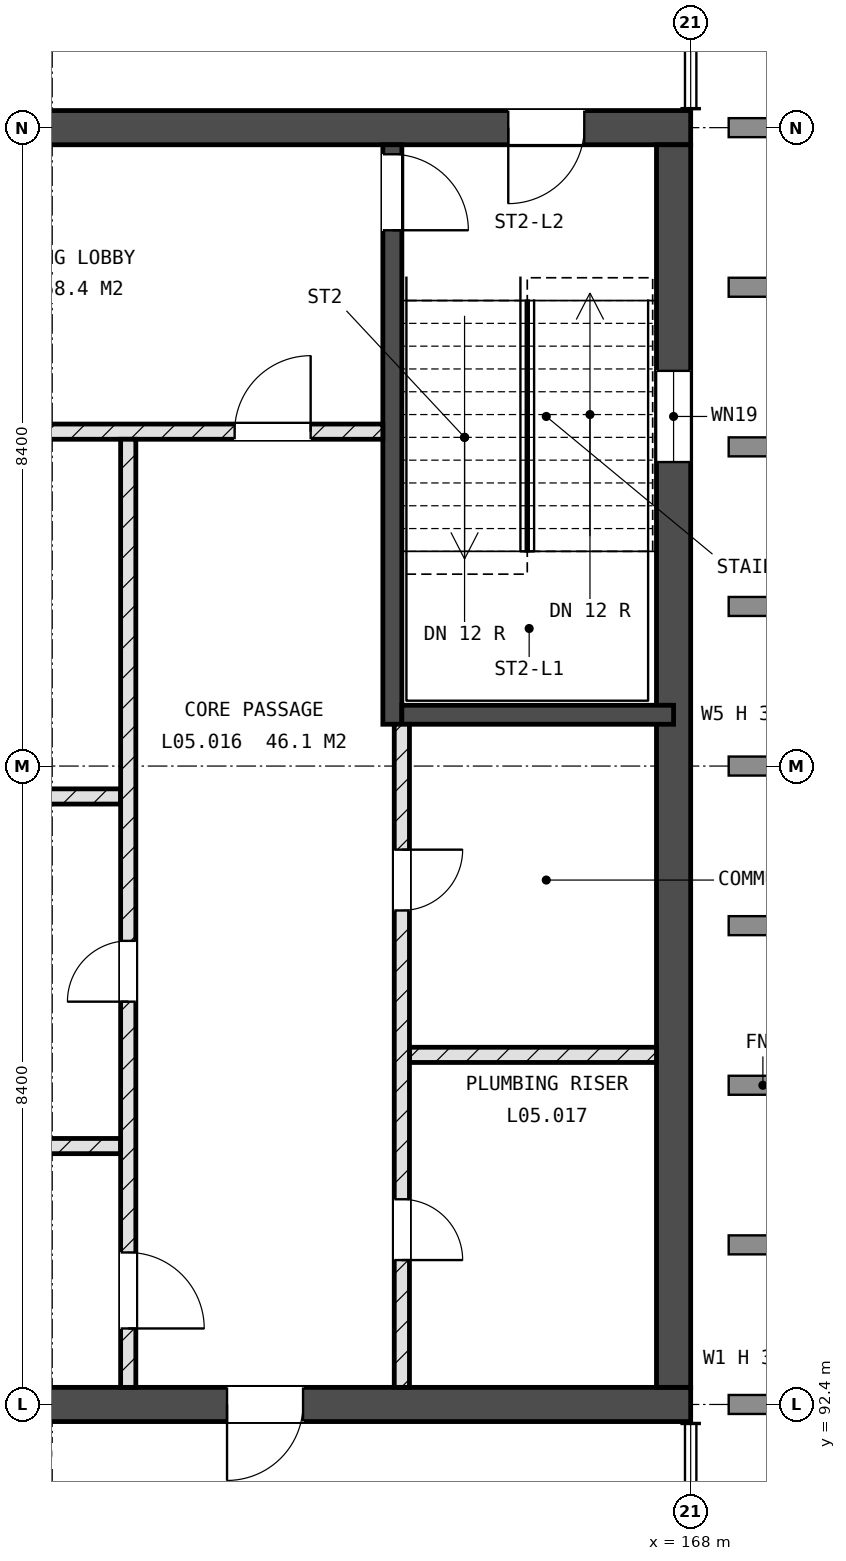
"""IFC4 building model, lengths in metres.
Left out: names, types, materials, properties, quantities, classifications, styles, units other than length and angle.
Written with IfcOpenShell. Run it as: python <this file> out.ifc"""

import sys

from ifc_helpers import new_model, si_unit, direction, frame, frame_2d, origin, place, context, subcontext, project, spatial, rectangle, extrude, element, fill, save


model = new_model("IFC4")
c1 = context("Model", 3, precision=1e-05, world=origin(), true_north=direction((0.0, 1.0)))
c2 = subcontext(c1, "Body", "Model", "MODEL_VIEW")
j1 = project(units=[si_unit("LENGTHUNIT", "METRE"), si_unit("PLANEANGLEUNIT", "RADIAN")], contexts=[c1])
p1 = place(None, origin())
s1 = spatial("IfcSite", under=j1, at=p1, CompositionType="ELEMENT")
p2 = place(p1, origin())
s2 = spatial("IfcBuilding", under=s1, at=p2, CompositionType="ELEMENT")
p3 = place(p2, frame((0.0, 0.0, 21.6)))
s3 = spatial("IfcBuildingStorey", under=s2, at=p3, CompositionType="ELEMENT", Elevation=21.6)
p4 = place(p3, frame((142.8, 92.4, -0.25), z_axis=(0.0, 0.0, 1.0), x_axis=(1.0, 0.0, 0.0)))
e1 = element("IfcWall", 1, at=p4, inside=s3, PredefinedType="SHEAR", context=c2, shape_type="SweptSolid", body=[
    extrude(rectangle(XDim=25.2, YDim=0.45, at=frame_2d((12.6, 0.0))), origin(), (0.0, 0.0, 1.0), 3.6),
])
p5 = place(p4, frame((1.4, 0.0, 0.25)))
e2 = element("IfcOpeningElement", 2, at=p5, cuts=e1, PredefinedType="OPENING", context=c2, shape_type="SweptSolid", body=[
    extrude(rectangle(XDim=1.0, YDim=2.1, at=frame_2d((0.5, 1.05))), frame((0.0, 0.235, 0.0), z_axis=(0.0, -1.0, 0.0), x_axis=(1.0, 0.0, 0.0)), (0.0, 0.0, 1.0), 0.47),
])
p6 = place(p4, frame((19.1, 0.0, 0.25)))
e3 = element("IfcOpeningElement", 3, at=p6, cuts=e1, PredefinedType="OPENING", context=c2, shape_type="SweptSolid", body=[
    extrude(rectangle(XDim=1.0, YDim=2.1, at=frame_2d((0.5, 1.05))), frame((0.0, 0.235, 0.0), z_axis=(0.0, -1.0, 0.0), x_axis=(1.0, 0.0, 0.0)), (0.0, 0.0, 1.0), 0.47),
])
p7 = place(p4, frame((10.4, 0.0, 0.25)))
e4 = element("IfcOpeningElement", 4, at=p7, cuts=e1, PredefinedType="OPENING", context=c2, shape_type="SweptSolid", body=[
    extrude(rectangle(XDim=1.0, YDim=2.1, at=frame_2d((0.5, 1.05))), frame((0.0, 0.235, 0.0), z_axis=(0.0, -1.0, 0.0), x_axis=(1.0, 0.0, 0.0)), (0.0, 0.0, 1.0), 0.47),
])
p8 = place(p3, frame((142.8, 109.2, -0.25), z_axis=(0.0, 0.0, 1.0), x_axis=(1.0, 0.0, 0.0)))
e5 = element("IfcWall", 5, at=p8, inside=s3, PredefinedType="SHEAR", context=c2, shape_type="SweptSolid", body=[
    extrude(rectangle(XDim=25.2, YDim=0.45, at=frame_2d((12.6, 0.0))), origin(), (0.0, 0.0, 1.0), 3.6),
])
p9 = place(p8, frame((22.8, 0.0, 0.25)))
e6 = element("IfcOpeningElement", 6, at=p9, cuts=e5, PredefinedType="OPENING", context=c2, shape_type="SweptSolid", body=[
    extrude(rectangle(XDim=1.0, YDim=2.1, at=frame_2d((0.5, 1.05))), frame((0.0, 0.235, 0.0), z_axis=(0.0, -1.0, 0.0), x_axis=(1.0, 0.0, 0.0)), (0.0, 0.0, 1.0), 0.47),
])
p10 = place(p8, frame((1.5, 0.0, 0.25)))
e7 = element("IfcOpeningElement", 7, at=p10, cuts=e5, PredefinedType="OPENING", context=c2, shape_type="SweptSolid", body=[
    extrude(rectangle(XDim=0.8, YDim=2.1, at=frame_2d((0.4, 1.05))), frame((0.0, 0.235, 0.0), z_axis=(0.0, -1.0, 0.0), x_axis=(1.0, 0.0, 0.0)), (0.0, 0.0, 1.0), 0.47),
])
p11 = place(p8, frame((13.4, 0.0, 0.25)))
e8 = element("IfcOpeningElement", 8, at=p11, cuts=e5, PredefinedType="OPENING", context=c2, shape_type="SweptSolid", body=[
    extrude(rectangle(XDim=1.0, YDim=2.1, at=frame_2d((0.5, 1.05))), frame((0.0, 0.235, 0.0), z_axis=(0.0, -1.0, 0.0), x_axis=(1.0, 0.0, 0.0)), (0.0, 0.0, 1.0), 0.47),
])
p12 = place(p3, frame((167.775, 92.625, -0.25), z_axis=(0.0, 0.0, 1.0), x_axis=(0.0, 1.0, 0.0)))
e9 = element("IfcWall", 9, at=p12, inside=s3, PredefinedType="SHEAR", context=c2, shape_type="SweptSolid", body=[
    extrude(rectangle(XDim=16.35, YDim=0.45, at=frame_2d((8.175, 0.0))), origin(), (0.0, 0.0, 1.0), 3.6),
])
p13 = place(p12, frame((12.175, 0.0, 1.85)))
e10 = element("IfcOpeningElement", 10, at=p13, cuts=e9, PredefinedType="OPENING", context=c2, shape_type="SweptSolid", body=[
    extrude(rectangle(XDim=1.2, YDim=0.9, at=frame_2d((0.6, 0.45))), frame((0.0, 0.235, 0.0), z_axis=(0.0, -1.0, 0.0), x_axis=(1.0, 0.0, 0.0)), (0.0, 0.0, 1.0), 0.47),
])
p14 = place(p3, frame((164.075, 101.35, -0.25), z_axis=(0.0, 0.0, 1.0), x_axis=(0.0, 1.0, 0.0)))
e11 = element("IfcWall", 11, at=p14, inside=s3, PredefinedType="SHEAR", context=c2, shape_type="SweptSolid", body=[
    extrude(rectangle(XDim=7.625, YDim=0.25, at=frame_2d((3.812, 0.0))), origin(), (0.0, 0.0, 1.0), 3.6),
])
p15 = place(p14, frame((6.5, 0.0, 0.25)))
e12 = element("IfcOpeningElement", 12, at=p15, cuts=e11, PredefinedType="OPENING", context=c2, shape_type="SweptSolid", body=[
    extrude(rectangle(XDim=1.0, YDim=2.1, at=frame_2d((0.5, 1.05))), frame((0.0, 0.135, 0.0), z_axis=(0.0, -1.0, 0.0), x_axis=(1.0, 0.0, 0.0)), (0.0, 0.0, 1.0), 0.27),
])
p16 = place(p3, frame((164.2, 101.475, -0.25), z_axis=(0.0, 0.0, 1.0), x_axis=(1.0, 0.0, 0.0)))
e13 = element("IfcWall", 13, at=p16, inside=s3, PredefinedType="SHEAR", context=c2, shape_type="SweptSolid", body=[
    extrude(rectangle(XDim=3.575, YDim=0.25, at=frame_2d((1.788, 0.0))), origin(), (0.0, 0.0, 1.0), 3.6),
])
p17 = place(p3, frame((158.25, 95.8, 0.0), z_axis=(0.0, 0.0, 1.0), x_axis=(1.0, 0.0, 0.0)))
e14 = element("IfcWall", 14, at=p17, inside=s3, PredefinedType="SOLIDWALL", context=c2, shape_type="SweptSolid", body=[
    extrude(rectangle(XDim=2.25, YDim=0.2, at=frame_2d((1.125, 0.0))), origin(), (0.0, 0.0, 1.0), 3.3),
])
p18 = place(p3, frame((164.3, 97.0, 0.0), z_axis=(0.0, 0.0, 1.0), x_axis=(1.0, 0.0, 0.0)))
e15 = element("IfcWall", 15, at=p18, inside=s3, PredefinedType="SOLIDWALL", context=c2, shape_type="SweptSolid", body=[
    extrude(rectangle(XDim=3.25, YDim=0.2, at=frame_2d((1.625, 0.0))), origin(), (0.0, 0.0, 1.0), 3.3),
])
p19 = place(p3, frame((146.5, 100.4, 0.0), z_axis=(0.0, 0.0, 1.0), x_axis=(1.0, 0.0, 0.0)))
e16 = element("IfcWall", 16, at=p19, inside=s3, PredefinedType="SOLIDWALL", context=c2, shape_type="SweptSolid", body=[
    extrude(rectangle(XDim=14.0, YDim=0.2, at=frame_2d((7.0, 0.0))), origin(), (0.0, 0.0, 1.0), 3.3),
])
p20 = place(p3, frame((143.25, 105.2, 0.0), z_axis=(0.0, 0.0, 1.0), x_axis=(1.0, 0.0, 0.0)))
e17 = element("IfcWall", 17, at=p20, inside=s3, PredefinedType="SOLIDWALL", context=c2, shape_type="SweptSolid", body=[
    extrude(rectangle(XDim=20.7, YDim=0.2, at=frame_2d((10.35, 0.0))), origin(), (0.0, 0.0, 1.0), 3.3),
])
p21 = place(p20, frame((11.45, 0.0, 0.0)))
e18 = element("IfcOpeningElement", 18, at=p21, cuts=e17, PredefinedType="OPENING", context=c2, shape_type="SweptSolid", body=[
    extrude(rectangle(XDim=0.8, YDim=2.1, at=frame_2d((0.4, 1.05))), frame((0.0, 0.11, 0.0), z_axis=(0.0, -1.0, 0.0), x_axis=(1.0, 0.0, 0.0)), (0.0, 0.0, 1.0), 0.22),
])
p22 = place(p20, frame((18.75, 0.0, 0.0)))
e19 = element("IfcOpeningElement", 19, at=p22, cuts=e17, PredefinedType="OPENING", context=c2, shape_type="SweptSolid", body=[
    extrude(rectangle(XDim=1.0, YDim=2.1, at=frame_2d((0.5, 1.05))), frame((0.0, 0.11, 0.0), z_axis=(0.0, -1.0, 0.0), x_axis=(1.0, 0.0, 0.0)), (0.0, 0.0, 1.0), 0.22),
])
p23 = place(p3, frame((160.6, 92.625, 0.0), z_axis=(0.0, 0.0, 1.0), x_axis=(0.0, 1.0, 0.0)))
e20 = element("IfcWall", 20, at=p23, inside=s3, PredefinedType="SOLIDWALL", context=c2, shape_type="SweptSolid", body=[
    extrude(rectangle(XDim=12.475, YDim=0.2, at=frame_2d((6.238, 0.0))), origin(), (0.0, 0.0, 1.0), 3.3),
])
p24 = place(p23, frame((5.075, 0.0, 0.0)))
e21 = element("IfcOpeningElement", 21, at=p24, cuts=e20, PredefinedType="OPENING", context=c2, shape_type="SweptSolid", body=[
    extrude(rectangle(XDim=0.8, YDim=2.1, at=frame_2d((0.4, 1.05))), frame((0.0, 0.11, 0.0), z_axis=(0.0, -1.0, 0.0), x_axis=(1.0, 0.0, 0.0)), (0.0, 0.0, 1.0), 0.22),
])
p25 = place(p23, frame((0.775, 0.0, 0.0)))
e22 = element("IfcOpeningElement", 22, at=p25, cuts=e20, PredefinedType="OPENING", context=c2, shape_type="SweptSolid", body=[
    extrude(rectangle(XDim=1.0, YDim=2.1, at=frame_2d((0.5, 1.05))), frame((0.0, 0.11, 0.0), z_axis=(0.0, -1.0, 0.0), x_axis=(1.0, 0.0, 0.0)), (0.0, 0.0, 1.0), 0.22),
])
p26 = place(p3, frame((164.2, 92.625, 0.0), z_axis=(0.0, 0.0, 1.0), x_axis=(0.0, 1.0, 0.0)))
e23 = element("IfcWall", 23, at=p26, inside=s3, PredefinedType="SOLIDWALL", context=c2, shape_type="SweptSolid", body=[
    extrude(rectangle(XDim=8.725, YDim=0.2, at=frame_2d((4.363, 0.0))), origin(), (0.0, 0.0, 1.0), 3.3),
])
p27 = place(p26, frame((1.675, 0.0, 0.0)))
e24 = element("IfcOpeningElement", 24, at=p27, cuts=e23, PredefinedType="OPENING", context=c2, shape_type="SweptSolid", body=[
    extrude(rectangle(XDim=0.8, YDim=2.1, at=frame_2d((0.4, 1.05))), frame((0.0, 0.11, 0.0), z_axis=(0.0, -1.0, 0.0), x_axis=(1.0, 0.0, 0.0)), (0.0, 0.0, 1.0), 0.22),
])
p28 = place(p26, frame((6.275, 0.0, 0.0)))
e25 = element("IfcOpeningElement", 25, at=p28, cuts=e23, PredefinedType="OPENING", context=c2, shape_type="SweptSolid", body=[
    extrude(rectangle(XDim=0.8, YDim=2.1, at=frame_2d((0.4, 1.05))), frame((0.0, 0.11, 0.0), z_axis=(0.0, -1.0, 0.0), x_axis=(1.0, 0.0, 0.0)), (0.0, 0.0, 1.0), 0.22),
])
p29 = place(p13, origin())
e26 = element("IfcWindow", 26, at=p29, inside=s3, PartitioningType="SINGLE_PANEL", PredefinedType="WINDOW", context=c2, shape_type="SweptSolid", body=[
    extrude(rectangle(XDim=1.2, YDim=0.9, at=frame_2d((0.6, 0.45))), frame((0.0, 0.03, 0.0), z_axis=(0.0, -1.0, 0.0), x_axis=(1.0, 0.0, 0.0)), (0.0, 0.0, 1.0), 0.06),
])
fill(e10, e26)
p30 = place(p15, origin())
e27 = element("IfcDoor", 27, at=p30, inside=s3, OperationType="SINGLE_SWING_LEFT", PredefinedType="DOOR", context=c2, shape_type="SweptSolid", body=[
    extrude(rectangle(XDim=1.0, YDim=2.1, at=frame_2d((0.5, 1.05))), frame((0.0, 0.025, 0.0), z_axis=(0.0, -1.0, 0.0), x_axis=(1.0, 0.0, 0.0)), (0.0, 0.0, 1.0), 0.05),
])
fill(e12, e27)
p31 = place(p9, origin())
e28 = element("IfcDoor", 28, at=p31, inside=s3, OperationType="SINGLE_SWING_LEFT", PredefinedType="DOOR", context=c2, shape_type="SweptSolid", body=[
    extrude(rectangle(XDim=1.0, YDim=2.1, at=frame_2d((0.5, 1.05))), frame((0.0, 0.025, 0.0), z_axis=(0.0, -1.0, 0.0), x_axis=(1.0, 0.0, 0.0)), (0.0, 0.0, 1.0), 0.05),
])
fill(e6, e28)
p32 = place(p27, origin())
e29 = element("IfcDoor", 29, at=p32, inside=s3, OperationType="SINGLE_SWING_LEFT", PredefinedType="DOOR", context=c2, shape_type="SweptSolid", body=[
    extrude(rectangle(XDim=0.8, YDim=2.1, at=frame_2d((0.4, 1.05))), frame((0.0, 0.025, 0.0), z_axis=(0.0, -1.0, 0.0), x_axis=(1.0, 0.0, 0.0)), (0.0, 0.0, 1.0), 0.05),
])
fill(e24, e29)
p33 = place(p28, origin())
e30 = element("IfcDoor", 30, at=p33, inside=s3, OperationType="SINGLE_SWING_RIGHT", PredefinedType="DOOR", context=c2, shape_type="SweptSolid", body=[
    extrude(rectangle(XDim=0.8, YDim=2.1, at=frame_2d((0.4, 1.05))), frame((0.0, 0.025, 0.0), z_axis=(0.0, -1.0, 0.0), x_axis=(1.0, 0.0, 0.0)), (0.0, 0.0, 1.0), 0.05),
])
fill(e25, e30)
p34 = place(p24, origin())
e31 = element("IfcDoor", 31, at=p34, inside=s3, OperationType="SINGLE_SWING_RIGHT", PredefinedType="DOOR", context=c2, shape_type="SweptSolid", body=[
    extrude(rectangle(XDim=0.8, YDim=2.1, at=frame_2d((0.4, 1.05))), frame((0.0, 0.025, 0.0), z_axis=(0.0, -1.0, 0.0), x_axis=(1.0, 0.0, 0.0)), (0.0, 0.0, 1.0), 0.05),
])
fill(e21, e31)
p35 = place(p6, origin())
e32 = element("IfcDoor", 32, at=p35, inside=s3, OperationType="SINGLE_SWING_LEFT", PredefinedType="DOOR", context=c2, shape_type="SweptSolid", body=[
    extrude(rectangle(XDim=1.0, YDim=2.1, at=frame_2d((0.5, 1.05))), frame((0.0, 0.025, 0.0), z_axis=(0.0, -1.0, 0.0), x_axis=(1.0, 0.0, 0.0)), (0.0, 0.0, 1.0), 0.05),
])
fill(e3, e32)
p36 = place(p25, origin())
e33 = element("IfcDoor", 33, at=p36, inside=s3, OperationType="SINGLE_SWING_LEFT", PredefinedType="DOOR", context=c2, shape_type="SweptSolid", body=[
    extrude(rectangle(XDim=1.0, YDim=2.1, at=frame_2d((0.5, 1.05))), frame((0.0, 0.025, 0.0), z_axis=(0.0, -1.0, 0.0), x_axis=(1.0, 0.0, 0.0)), (0.0, 0.0, 1.0), 0.05),
])
fill(e22, e33)
p37 = place(p22, origin())
e34 = element("IfcDoor", 34, at=p37, inside=s3, OperationType="SINGLE_SWING_LEFT", PredefinedType="DOOR", context=c2, shape_type="SweptSolid", body=[
    extrude(rectangle(XDim=1.0, YDim=2.1, at=frame_2d((0.5, 1.05))), frame((0.0, 0.025, 0.0), z_axis=(0.0, -1.0, 0.0), x_axis=(1.0, 0.0, 0.0)), (0.0, 0.0, 1.0), 0.05),
])
fill(e19, e34)
save(model, sys.argv[1])
